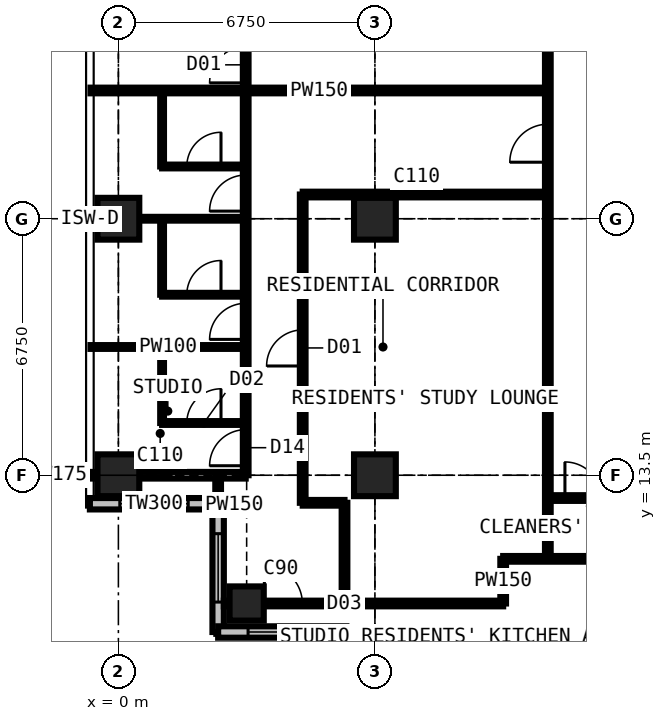
"""IFC4 building model, lengths in metres.
Left out: names, types, materials, properties, quantities, classifications, styles, units other than length and angle.
Written with IfcOpenShell. Run it as: python <this file> out.ifc"""

import sys

from ifc_helpers import new_model, si_unit, direction, frame, frame_2d, origin, origin_2d, place, context, subcontext, project, spatial, rectangle, extrude, element, fill, save


model = new_model("IFC4")
c1 = context("Model", 3, precision=1e-05, world=origin(), true_north=direction((0.0, 1.0)))
c2 = subcontext(c1, "Body", "Model", "MODEL_VIEW")
j1 = project(units=[si_unit("LENGTHUNIT", "METRE"), si_unit("PLANEANGLEUNIT", "RADIAN")], contexts=[c1])
p1 = place(None, origin())
s1 = spatial("IfcSite", under=j1, at=p1, CompositionType="ELEMENT")
p2 = place(p1, origin())
s2 = spatial("IfcBuilding", under=s1, at=p2, CompositionType="ELEMENT")
p3 = place(p2, frame((0.0, 0.0, 218.7)))
s3 = spatial("IfcBuildingStorey", under=s2, at=p3, CompositionType="ELEMENT", Elevation=218.7)
for number, where, z_axis, x_axis in (
    (1, (0.0, 13.5, 0.0), (0.0, 0.0, 1.0), (1.0, 0.0, 0.0)),
    (2, (0.0, 20.25, 0.0), (0.0, 0.0, 1.0), (1.0, 0.0, 0.0)),
):
    element("IfcColumn", number, at=place(p3, frame(where, z_axis=z_axis, x_axis=x_axis)), inside=s3, PredefinedType="COLUMN", context=c2, shape_type="SweptSolid", body=[
        extrude(rectangle(XDim=1.1, YDim=1.1, at=origin_2d()), origin(), (0.0, 0.0, 1.0), 3.6),
    ])
p4 = place(p3, frame((3.375, 10.125, 0.0), z_axis=(0.0, 0.0, 1.0), x_axis=(1.0, 0.0, 0.0)))
e3 = element("IfcColumn", 3, at=p4, inside=s3, PredefinedType="COLUMN", context=c2, shape_type="SweptSolid", body=[
    extrude(rectangle(XDim=0.9, YDim=0.9, at=origin_2d()), origin(), (0.0, 0.0, 1.0), 3.6),
])
for number, where, z_axis, x_axis in (
    (4, (6.75, 13.5, 0.0), (0.0, 0.0, 1.0), (1.0, 0.0, 0.0)),
    (5, (6.75, 20.25, 0.0), (0.0, 0.0, 1.0), (1.0, 0.0, 0.0)),
):
    element("IfcColumn", number, at=place(p3, frame(where, z_axis=z_axis, x_axis=x_axis)), inside=s3, PredefinedType="COLUMN", context=c2, shape_type="SweptSolid", body=[
        extrude(rectangle(XDim=1.1, YDim=1.1, at=origin_2d()), origin(), (0.0, 0.0, 1.0), 3.6),
    ])
p5 = place(p3, frame((-0.75, 12.75, 0.0), z_axis=(0.0, 0.0, 1.0), x_axis=(1.0, 0.0, 0.0)))
e6 = element("IfcWall", 6, at=p5, inside=s3, PredefinedType="SOLIDWALL", context=c2, shape_type="SweptSolid", body=[
    extrude(rectangle(XDim=3.375, YDim=0.3, at=frame_2d((1.688, 0.0))), origin(), (0.0, 0.0, 1.0), 3.375),
])
p6 = place(p5, frame((0.788, 0.0, 0.6)))
e7 = element("IfcOpeningElement", 7, at=p6, cuts=e6, PredefinedType="OPENING", context=c2, shape_type="SweptSolid", body=[
    extrude(rectangle(XDim=1.8, YDim=2.1, at=frame_2d((0.9, 1.05))), frame((0.0, 0.16, 0.0), z_axis=(0.0, -1.0, 0.0), x_axis=(1.0, 0.0, 0.0)), (0.0, 0.0, 1.0), 0.32),
])
p7 = place(p3, frame((2.625, 12.75, 0.0), z_axis=(0.0, 0.0, 1.0), x_axis=(0.0, -1.0, 0.0)))
e8 = element("IfcWall", 8, at=p7, inside=s3, PredefinedType="SOLIDWALL", context=c2, shape_type="SweptSolid", body=[
    extrude(rectangle(XDim=3.375, YDim=0.3, at=frame_2d((1.688, 0.0))), origin(), (0.0, 0.0, 1.0), 3.375),
])
p8 = place(p7, frame((0.788, 0.0, 0.6)))
e9 = element("IfcOpeningElement", 9, at=p8, cuts=e8, PredefinedType="OPENING", context=c2, shape_type="SweptSolid", body=[
    extrude(rectangle(XDim=1.8, YDim=2.1, at=frame_2d((0.9, 1.05))), frame((0.0, 0.16, 0.0), z_axis=(0.0, -1.0, 0.0), x_axis=(1.0, 0.0, 0.0)), (0.0, 0.0, 1.0), 0.32),
])
p9 = place(p3, frame((2.625, 9.375, 0.0), z_axis=(0.0, 0.0, 1.0), x_axis=(1.0, 0.0, 0.0)))
e10 = element("IfcWall", 10, at=p9, inside=s3, PredefinedType="SOLIDWALL", context=c2, shape_type="SweptSolid", body=[
    extrude(rectangle(XDim=3.375, YDim=0.3, at=frame_2d((1.688, 0.0))), origin(), (0.0, 0.0, 1.0), 3.375),
])
p10 = place(p9, frame((0.788, 0.0, 0.6)))
e11 = element("IfcOpeningElement", 11, at=p10, cuts=e10, PredefinedType="OPENING", context=c2, shape_type="SweptSolid", body=[
    extrude(rectangle(XDim=1.8, YDim=2.1, at=frame_2d((0.9, 1.05))), frame((0.0, 0.16, 0.0), z_axis=(0.0, -1.0, 0.0), x_axis=(1.0, 0.0, 0.0)), (0.0, 0.0, 1.0), 0.32),
])
p11 = place(p3, frame((6.0, 9.375, 0.0), z_axis=(0.0, 0.0, 1.0), x_axis=(0.0, -1.0, 0.0)))
e12 = element("IfcWall", 12, at=p11, inside=s3, PredefinedType="SOLIDWALL", context=c2, shape_type="SweptSolid", body=[
    extrude(rectangle(XDim=3.375, YDim=0.3, at=frame_2d((1.688, 0.0))), origin(), (0.0, 0.0, 1.0), 3.375),
])
p12 = place(p11, frame((0.788, 0.0, 0.6)))
e13 = element("IfcOpeningElement", 13, at=p12, cuts=e12, PredefinedType="OPENING", context=c2, shape_type="SweptSolid", body=[
    extrude(rectangle(XDim=1.8, YDim=2.1, at=frame_2d((0.9, 1.05))), frame((0.0, 0.16, 0.0), z_axis=(0.0, -1.0, 0.0), x_axis=(1.0, 0.0, 0.0)), (0.0, 0.0, 1.0), 0.32),
])
p13 = place(p3, frame((-0.734, 13.5, 0.0), z_axis=(0.0, 0.0, 1.0), x_axis=(1.0, 0.0, 0.0)))
e14 = element("IfcWall", 14, at=p13, inside=s3, PredefinedType="PARTITIONING", context=c2, shape_type="SweptSolid", body=[
    extrude(rectangle(XDim=4.084, YDim=0.175, at=frame_2d((2.042, 0.0))), origin(), (0.0, 0.0, 1.0), 2.877),
])
p14 = place(p3, frame((-0.734, 16.875, 0.0), z_axis=(0.0, 0.0, 1.0), x_axis=(1.0, 0.0, 0.0)))
e15 = element("IfcWall", 15, at=p14, inside=s3, PredefinedType="PARTITIONING", context=c2, shape_type="SweptSolid", body=[
    extrude(rectangle(XDim=4.084, YDim=0.1, at=frame_2d((2.042, 0.0))), origin(), (0.0, 0.0, 1.0), 3.375),
])
p15 = place(p3, frame((-0.734, 20.25, 0.0), z_axis=(0.0, 0.0, 1.0), x_axis=(1.0, 0.0, 0.0)))
e16 = element("IfcWall", 16, at=p15, inside=s3, PredefinedType="PARTITIONING", context=c2, shape_type="SweptSolid", body=[
    extrude(rectangle(XDim=4.084, YDim=0.1, at=frame_2d((2.042, 0.0))), origin(), (0.0, 0.0, 1.0), 2.877),
])
p16 = place(p3, frame((-0.734, 23.625, 0.0), z_axis=(0.0, 0.0, 1.0), x_axis=(1.0, 0.0, 0.0)))
e17 = element("IfcWall", 17, at=p16, inside=s3, PredefinedType="PARTITIONING", context=c2, shape_type="SweptSolid", body=[
    extrude(rectangle(XDim=12.034, YDim=0.15, at=frame_2d((6.017, 0.0))), origin(), (0.0, 0.0, 1.0), 3.375),
])
p17 = place(p3, frame((1.15, 14.875, 0.0), z_axis=(0.0, 0.0, 1.0), x_axis=(0.0, 1.0, 0.0)))
e18 = element("IfcWall", 18, at=p17, inside=s3, PredefinedType="PARTITIONING", context=c2, shape_type="SweptSolid", body=[
    extrude(rectangle(XDim=2.0, YDim=0.1, at=frame_2d((1.0, 0.0))), origin(), (0.0, 0.0, 1.0), 3.375),
])
p18 = place(p3, frame((1.15, 14.875, 0.0), z_axis=(0.0, 0.0, 1.0), x_axis=(1.0, 0.0, 0.0)))
e19 = element("IfcWall", 19, at=p18, inside=s3, PredefinedType="PARTITIONING", context=c2, shape_type="SweptSolid", body=[
    extrude(rectangle(XDim=2.2, YDim=0.1, at=frame_2d((1.1, 0.0))), origin(), (0.0, 0.0, 1.0), 3.375),
])
p19 = place(p18, frame((0.65, 0.0, 0.0)))
e20 = element("IfcOpeningElement", 20, at=p19, cuts=e19, PredefinedType="OPENING", context=c2, shape_type="SweptSolid", body=[
    extrude(rectangle(XDim=0.9, YDim=2.2, at=frame_2d((0.45, 1.1))), frame((0.0, 0.06, 0.0), z_axis=(0.0, -1.0, 0.0), x_axis=(1.0, 0.0, 0.0)), (0.0, 0.0, 1.0), 0.12),
])
p20 = place(p3, frame((1.15, 18.25, 0.0), z_axis=(0.0, 0.0, 1.0), x_axis=(0.0, 1.0, 0.0)))
e21 = element("IfcWall", 21, at=p20, inside=s3, PredefinedType="PARTITIONING", context=c2, shape_type="SweptSolid", body=[
    extrude(rectangle(XDim=2.0, YDim=0.1, at=frame_2d((1.0, 0.0))), origin(), (0.0, 0.0, 1.0), 3.375),
])
p21 = place(p3, frame((1.15, 18.25, 0.0), z_axis=(0.0, 0.0, 1.0), x_axis=(1.0, 0.0, 0.0)))
e22 = element("IfcWall", 22, at=p21, inside=s3, PredefinedType="PARTITIONING", context=c2, shape_type="SweptSolid", body=[
    extrude(rectangle(XDim=2.2, YDim=0.1, at=frame_2d((1.1, 0.0))), origin(), (0.0, 0.0, 1.0), 3.375),
])
p22 = place(p21, frame((0.65, 0.0, 0.0)))
e23 = element("IfcOpeningElement", 23, at=p22, cuts=e22, PredefinedType="OPENING", context=c2, shape_type="SweptSolid", body=[
    extrude(rectangle(XDim=0.9, YDim=2.2, at=frame_2d((0.45, 1.1))), frame((0.0, 0.06, 0.0), z_axis=(0.0, -1.0, 0.0), x_axis=(1.0, 0.0, 0.0)), (0.0, 0.0, 1.0), 0.12),
])
p23 = place(p3, frame((1.15, 21.625, 0.0), z_axis=(0.0, 0.0, 1.0), x_axis=(0.0, 1.0, 0.0)))
e24 = element("IfcWall", 24, at=p23, inside=s3, PredefinedType="PARTITIONING", context=c2, shape_type="SweptSolid", body=[
    extrude(rectangle(XDim=2.0, YDim=0.1, at=frame_2d((1.0, 0.0))), origin(), (0.0, 0.0, 1.0), 3.375),
])
p24 = place(p3, frame((1.15, 21.625, 0.0), z_axis=(0.0, 0.0, 1.0), x_axis=(1.0, 0.0, 0.0)))
e25 = element("IfcWall", 25, at=p24, inside=s3, PredefinedType="PARTITIONING", context=c2, shape_type="SweptSolid", body=[
    extrude(rectangle(XDim=2.2, YDim=0.1, at=frame_2d((1.1, 0.0))), origin(), (0.0, 0.0, 1.0), 3.375),
])
p25 = place(p24, frame((0.65, 0.0, 0.0)))
e26 = element("IfcOpeningElement", 26, at=p25, cuts=e25, PredefinedType="OPENING", context=c2, shape_type="SweptSolid", body=[
    extrude(rectangle(XDim=0.9, YDim=2.2, at=frame_2d((0.45, 1.1))), frame((0.0, 0.06, 0.0), z_axis=(0.0, -1.0, 0.0), x_axis=(1.0, 0.0, 0.0)), (0.0, 0.0, 1.0), 0.12),
])
p26 = place(p3, frame((2.625, 12.766, 0.0), z_axis=(0.0, 0.0, 1.0), x_axis=(0.0, 1.0, 0.0)))
e27 = element("IfcWall", 27, at=p26, inside=s3, PredefinedType="PARTITIONING", context=c2, shape_type="SweptSolid", body=[
    extrude(rectangle(XDim=0.734, YDim=0.15, at=frame_2d((0.367, 0.0))), origin(), (0.0, 0.0, 1.0), 3.375),
])
p27 = place(p3, frame((2.775, 10.125, 0.0), z_axis=(0.0, 0.0, 1.0), x_axis=(1.0, 0.0, 0.0)))
e28 = element("IfcWall", 28, at=p27, inside=s3, PredefinedType="PARTITIONING", context=c2, shape_type="SweptSolid", body=[
    extrude(rectangle(XDim=7.35, YDim=0.15, at=frame_2d((3.675, 0.0))), origin(), (0.0, 0.0, 1.0), 2.877),
])
p28 = place(p27, frame((1.066, 0.0, 0.0)))
e29 = element("IfcOpeningElement", 29, at=p28, cuts=e28, PredefinedType="OPENING", context=c2, shape_type="SweptSolid", body=[
    extrude(rectangle(XDim=1.0, YDim=2.2, at=frame_2d((0.5, 1.1))), frame((0.0, 0.085, 0.0), z_axis=(0.0, -1.0, 0.0), x_axis=(1.0, 0.0, 0.0)), (0.0, 0.0, 1.0), 0.17),
])
p29 = place(p3, frame((3.35, 13.5, 0.0), z_axis=(0.0, 0.0, 1.0), x_axis=(0.0, 1.0, 0.0)))
e30 = element("IfcWall", 30, at=p29, inside=s3, PredefinedType="PARTITIONING", context=c2, shape_type="SweptSolid", body=[
    extrude(rectangle(XDim=13.5, YDim=0.15, at=frame_2d((6.75, 0.0))), origin(), (0.0, 0.0, 1.0), 3.375),
])
p30 = place(p29, frame((10.325, 0.0, 0.0)))
e31 = element("IfcOpeningElement", 31, at=p30, cuts=e30, PredefinedType="OPENING", context=c2, shape_type="SweptSolid", body=[
    extrude(rectangle(XDim=0.95, YDim=2.2, at=frame_2d((0.475, 1.1))), frame((0.0, 0.085, 0.0), z_axis=(0.0, -1.0, 0.0), x_axis=(1.0, 0.0, 0.0)), (0.0, 0.0, 1.0), 0.17),
])
p31 = place(p29, frame((0.25, 0.0, 0.0)))
e32 = element("IfcOpeningElement", 32, at=p31, cuts=e30, PredefinedType="OPENING", context=c2, shape_type="SweptSolid", body=[
    extrude(rectangle(XDim=0.95, YDim=2.2, at=frame_2d((0.475, 1.1))), frame((0.0, 0.085, 0.0), z_axis=(0.0, -1.0, 0.0), x_axis=(1.0, 0.0, 0.0)), (0.0, 0.0, 1.0), 0.17),
])
p32 = place(p29, frame((3.575, 0.0, 0.0)))
e33 = element("IfcOpeningElement", 33, at=p32, cuts=e30, PredefinedType="OPENING", context=c2, shape_type="SweptSolid", body=[
    extrude(rectangle(XDim=0.95, YDim=2.2, at=frame_2d((0.475, 1.1))), frame((0.0, 0.085, 0.0), z_axis=(0.0, -1.0, 0.0), x_axis=(1.0, 0.0, 0.0)), (0.0, 0.0, 1.0), 0.17),
])
p33 = place(p29, frame((6.95, 0.0, 0.0)))
e34 = element("IfcOpeningElement", 34, at=p33, cuts=e30, PredefinedType="OPENING", context=c2, shape_type="SweptSolid", body=[
    extrude(rectangle(XDim=0.95, YDim=2.2, at=frame_2d((0.475, 1.1))), frame((0.0, 0.085, 0.0), z_axis=(0.0, -1.0, 0.0), x_axis=(1.0, 0.0, 0.0)), (0.0, 0.0, 1.0), 0.17),
])
p34 = place(p3, frame((4.85, 12.775, 0.0), z_axis=(0.0, 0.0, 1.0), x_axis=(0.0, 1.0, 0.0)))
e35 = element("IfcWall", 35, at=p34, inside=s3, PredefinedType="PARTITIONING", context=c2, shape_type="SweptSolid", body=[
    extrude(rectangle(XDim=8.113, YDim=0.15, at=frame_2d((4.056, 0.0))), origin(), (0.0, 0.0, 1.0), 3.375),
])
p35 = place(p34, frame((3.6, 0.0, 0.0)))
e36 = element("IfcOpeningElement", 36, at=p35, cuts=e35, PredefinedType="OPENING", context=c2, shape_type="SweptSolid", body=[
    extrude(rectangle(XDim=0.95, YDim=2.2, at=frame_2d((0.475, 1.1))), frame((0.0, 0.085, 0.0), z_axis=(0.0, -1.0, 0.0), x_axis=(1.0, 0.0, 0.0)), (0.0, 0.0, 1.0), 0.17),
])
p36 = place(p3, frame((4.85, 12.775, 0.0), z_axis=(0.0, 0.0, 1.0), x_axis=(1.0, 0.0, 0.0)))
e37 = element("IfcWall", 37, at=p36, inside=s3, PredefinedType="PARTITIONING", context=c2, shape_type="SweptSolid", body=[
    extrude(rectangle(XDim=1.1, YDim=0.15, at=frame_2d((0.55, 0.0))), origin(), (0.0, 0.0, 1.0), 3.375),
])
p37 = place(p3, frame((4.85, 20.887, 0.0), z_axis=(0.0, 0.0, 1.0), x_axis=(1.0, 0.0, 0.0)))
e38 = element("IfcWall", 38, at=p37, inside=s3, PredefinedType="PARTITIONING", context=c2, shape_type="SweptSolid", body=[
    extrude(rectangle(XDim=6.45, YDim=0.15, at=frame_2d((3.225, 0.0))), origin(), (0.0, 0.0, 1.0), 3.375),
])
p38 = place(p3, frame((5.95, 10.125, 0.0), z_axis=(0.0, 0.0, 1.0), x_axis=(0.0, 1.0, 0.0)))
e39 = element("IfcWall", 39, at=p38, inside=s3, PredefinedType="PARTITIONING", context=c2, shape_type="SweptSolid", body=[
    extrude(rectangle(XDim=2.65, YDim=0.15, at=frame_2d((1.325, 0.0))), origin(), (0.0, 0.0, 1.0), 3.375),
])
p39 = place(p3, frame((10.125, 10.125, 0.0), z_axis=(0.0, 0.0, 1.0), x_axis=(0.0, 1.0, 0.0)))
e40 = element("IfcWall", 40, at=p39, inside=s3, PredefinedType="PARTITIONING", context=c2, shape_type="SweptSolid", body=[
    extrude(rectangle(XDim=1.175, YDim=0.15, at=frame_2d((0.587, 0.0))), origin(), (0.0, 0.0, 1.0), 3.375),
])
p40 = place(p3, frame((10.125, 11.3, 0.0), z_axis=(0.0, 0.0, 1.0), x_axis=(1.0, 0.0, 0.0)))
e41 = element("IfcWall", 41, at=p40, inside=s3, PredefinedType="PARTITIONING", context=c2, shape_type="SweptSolid", body=[
    extrude(rectangle(XDim=20.25, YDim=0.15, at=frame_2d((10.125, 0.0))), origin(), (0.0, 0.0, 1.0), 3.375),
])
p41 = place(p40, frame((6.95, 0.0, 0.0)))
e42 = element("IfcOpeningElement", 42, at=p41, cuts=e41, PredefinedType="OPENING", context=c2, shape_type="SweptSolid", body=[
    extrude(rectangle(XDim=0.95, YDim=2.2, at=frame_2d((0.475, 1.1))), frame((0.0, 0.085, 0.0), z_axis=(0.0, -1.0, 0.0), x_axis=(1.0, 0.0, 0.0)), (0.0, 0.0, 1.0), 0.17),
])
p42 = place(p40, frame((10.375, 0.0, 0.0)))
e43 = element("IfcOpeningElement", 43, at=p42, cuts=e41, PredefinedType="OPENING", context=c2, shape_type="SweptSolid", body=[
    extrude(rectangle(XDim=0.95, YDim=2.2, at=frame_2d((0.475, 1.1))), frame((0.0, 0.085, 0.0), z_axis=(0.0, -1.0, 0.0), x_axis=(1.0, 0.0, 0.0)), (0.0, 0.0, 1.0), 0.17),
])
p43 = place(p40, frame((13.75, 0.0, 0.0)))
e44 = element("IfcOpeningElement", 44, at=p43, cuts=e41, PredefinedType="OPENING", context=c2, shape_type="SweptSolid", body=[
    extrude(rectangle(XDim=0.95, YDim=2.2, at=frame_2d((0.475, 1.1))), frame((0.0, 0.085, 0.0), z_axis=(0.0, -1.0, 0.0), x_axis=(1.0, 0.0, 0.0)), (0.0, 0.0, 1.0), 0.17),
])
p44 = place(p40, frame((17.475, 0.0, 0.0)))
e45 = element("IfcOpeningElement", 45, at=p44, cuts=e41, PredefinedType="OPENING", context=c2, shape_type="SweptSolid", body=[
    extrude(rectangle(XDim=1.0, YDim=2.2, at=frame_2d((0.5, 1.1))), frame((0.0, 0.085, 0.0), z_axis=(0.0, -1.0, 0.0), x_axis=(1.0, 0.0, 0.0)), (0.0, 0.0, 1.0), 0.17),
])
p45 = place(p3, frame((11.3, 11.3, 0.0), z_axis=(0.0, 0.0, 1.0), x_axis=(0.0, 1.0, 0.0)))
e46 = element("IfcWall", 46, at=p45, inside=s3, PredefinedType="PARTITIONING", context=c2, shape_type="SweptSolid", body=[
    extrude(rectangle(XDim=19.3, YDim=0.15, at=frame_2d((9.65, 0.0))), origin(), (0.0, 0.0, 1.0), 3.375),
])
p46 = place(p45, frame((13.525, 0.0, 0.0)))
e47 = element("IfcOpeningElement", 47, at=p46, cuts=e46, PredefinedType="OPENING", context=c2, shape_type="SweptSolid", body=[
    extrude(rectangle(XDim=1.0, YDim=2.2, at=frame_2d((0.5, 1.1))), frame((0.0, 0.085, 0.0), z_axis=(0.0, -1.0, 0.0), x_axis=(1.0, 0.0, 0.0)), (0.0, 0.0, 1.0), 0.17),
])
p47 = place(p45, frame((10.438, 0.0, 0.0)))
e48 = element("IfcOpeningElement", 48, at=p47, cuts=e46, PredefinedType="OPENING", context=c2, shape_type="SweptSolid", body=[
    extrude(rectangle(XDim=1.0, YDim=2.2, at=frame_2d((0.5, 1.1))), frame((0.0, 0.085, 0.0), z_axis=(0.0, -1.0, 0.0), x_axis=(1.0, 0.0, 0.0)), (0.0, 0.0, 1.0), 0.17),
])
p48 = place(p3, frame((11.3, 12.9, 0.0), z_axis=(0.0, 0.0, 1.0), x_axis=(1.0, 0.0, 0.0)))
e49 = element("IfcWall", 49, at=p48, inside=s3, PredefinedType="PARTITIONING", context=c2, shape_type="SweptSolid", body=[
    extrude(rectangle(XDim=1.9, YDim=0.15, at=frame_2d((0.95, 0.0))), origin(), (0.0, 0.0, 1.0), 2.877),
])
p49 = place(p48, frame((0.45, 0.0, 0.0)))
e50 = element("IfcOpeningElement", 50, at=p49, cuts=e49, PredefinedType="OPENING", context=c2, shape_type="SweptSolid", body=[
    extrude(rectangle(XDim=0.95, YDim=2.2, at=frame_2d((0.475, 1.1))), frame((0.0, 0.085, 0.0), z_axis=(0.0, -1.0, 0.0), x_axis=(1.0, 0.0, 0.0)), (0.0, 0.0, 1.0), 0.17),
])
p50 = place(p6, origin())
e51 = element("IfcWindow", 51, at=p50, inside=s3, PartitioningType="SINGLE_PANEL", PredefinedType="WINDOW", context=c2, shape_type="SweptSolid", body=[
    extrude(rectangle(XDim=1.8, YDim=2.1, at=frame_2d((0.9, 1.05))), frame((0.0, 0.03, 0.0), z_axis=(0.0, -1.0, 0.0), x_axis=(1.0, 0.0, 0.0)), (0.0, 0.0, 1.0), 0.06),
])
fill(e7, e51)
p51 = place(p8, origin())
e52 = element("IfcWindow", 52, at=p51, inside=s3, PartitioningType="SINGLE_PANEL", PredefinedType="WINDOW", context=c2, shape_type="SweptSolid", body=[
    extrude(rectangle(XDim=1.8, YDim=2.1, at=frame_2d((0.9, 1.05))), frame((0.0, 0.03, 0.0), z_axis=(0.0, -1.0, 0.0), x_axis=(1.0, 0.0, 0.0)), (0.0, 0.0, 1.0), 0.06),
])
fill(e9, e52)
p52 = place(p10, origin())
e53 = element("IfcWindow", 53, at=p52, inside=s3, PartitioningType="SINGLE_PANEL", PredefinedType="WINDOW", context=c2, shape_type="SweptSolid", body=[
    extrude(rectangle(XDim=1.8, YDim=2.1, at=frame_2d((0.9, 1.05))), frame((0.0, 0.03, 0.0), z_axis=(0.0, -1.0, 0.0), x_axis=(1.0, 0.0, 0.0)), (0.0, 0.0, 1.0), 0.06),
])
fill(e11, e53)
p53 = place(p49, origin())
e54 = element("IfcDoor", 54, at=p53, inside=s3, OperationType="SINGLE_SWING_LEFT", PredefinedType="DOOR", context=c2, shape_type="SweptSolid", body=[
    extrude(rectangle(XDim=0.95, YDim=2.2, at=frame_2d((0.475, 1.1))), frame((0.0, 0.025, 0.0), z_axis=(0.0, -1.0, 0.0), x_axis=(1.0, 0.0, 0.0)), (0.0, 0.0, 1.0), 0.05),
])
fill(e50, e54)
p54 = place(p28, origin())
e55 = element("IfcDoor", 55, at=p54, inside=s3, OperationType="SINGLE_SWING_LEFT", PredefinedType="DOOR", context=c2, shape_type="SweptSolid", body=[
    extrude(rectangle(XDim=1.0, YDim=2.2, at=frame_2d((0.5, 1.1))), frame((0.0, 0.025, 0.0), z_axis=(0.0, -1.0, 0.0), x_axis=(1.0, 0.0, 0.0)), (0.0, 0.0, 1.0), 0.05),
])
fill(e29, e55)
p55 = place(p30, origin())
e56 = element("IfcDoor", 56, at=p55, inside=s3, OperationType="SINGLE_SWING_LEFT", PredefinedType="DOOR", context=c2, shape_type="SweptSolid", body=[
    extrude(rectangle(XDim=0.95, YDim=2.2, at=frame_2d((0.475, 1.1))), frame((0.0, 0.025, 0.0), z_axis=(0.0, -1.0, 0.0), x_axis=(1.0, 0.0, 0.0)), (0.0, 0.0, 1.0), 0.05),
])
fill(e31, e56)
p56 = place(p31, origin())
e57 = element("IfcDoor", 57, at=p56, inside=s3, OperationType="SINGLE_SWING_LEFT", PredefinedType="DOOR", context=c2, shape_type="SweptSolid", body=[
    extrude(rectangle(XDim=0.95, YDim=2.2, at=frame_2d((0.475, 1.1))), frame((0.0, 0.025, 0.0), z_axis=(0.0, -1.0, 0.0), x_axis=(1.0, 0.0, 0.0)), (0.0, 0.0, 1.0), 0.05),
])
fill(e32, e57)
p57 = place(p19, origin())
e58 = element("IfcDoor", 58, at=p57, inside=s3, OperationType="SINGLE_SWING_RIGHT", PredefinedType="DOOR", context=c2, shape_type="SweptSolid", body=[
    extrude(rectangle(XDim=0.9, YDim=2.2, at=frame_2d((0.45, 1.1))), frame((0.0, 0.025, 0.0), z_axis=(0.0, -1.0, 0.0), x_axis=(1.0, 0.0, 0.0)), (0.0, 0.0, 1.0), 0.05),
])
fill(e20, e58)
p58 = place(p32, origin())
e59 = element("IfcDoor", 59, at=p58, inside=s3, OperationType="SINGLE_SWING_LEFT", PredefinedType="DOOR", context=c2, shape_type="SweptSolid", body=[
    extrude(rectangle(XDim=0.95, YDim=2.2, at=frame_2d((0.475, 1.1))), frame((0.0, 0.025, 0.0), z_axis=(0.0, -1.0, 0.0), x_axis=(1.0, 0.0, 0.0)), (0.0, 0.0, 1.0), 0.05),
])
fill(e33, e59)
p59 = place(p22, origin())
e60 = element("IfcDoor", 60, at=p59, inside=s3, OperationType="SINGLE_SWING_RIGHT", PredefinedType="DOOR", context=c2, shape_type="SweptSolid", body=[
    extrude(rectangle(XDim=0.9, YDim=2.2, at=frame_2d((0.45, 1.1))), frame((0.0, 0.025, 0.0), z_axis=(0.0, -1.0, 0.0), x_axis=(1.0, 0.0, 0.0)), (0.0, 0.0, 1.0), 0.05),
])
fill(e23, e60)
p60 = place(p33, origin())
e61 = element("IfcDoor", 61, at=p60, inside=s3, OperationType="SINGLE_SWING_LEFT", PredefinedType="DOOR", context=c2, shape_type="SweptSolid", body=[
    extrude(rectangle(XDim=0.95, YDim=2.2, at=frame_2d((0.475, 1.1))), frame((0.0, 0.025, 0.0), z_axis=(0.0, -1.0, 0.0), x_axis=(1.0, 0.0, 0.0)), (0.0, 0.0, 1.0), 0.05),
])
fill(e34, e61)
p61 = place(p25, origin())
e62 = element("IfcDoor", 62, at=p61, inside=s3, OperationType="SINGLE_SWING_RIGHT", PredefinedType="DOOR", context=c2, shape_type="SweptSolid", body=[
    extrude(rectangle(XDim=0.9, YDim=2.2, at=frame_2d((0.45, 1.1))), frame((0.0, 0.025, 0.0), z_axis=(0.0, -1.0, 0.0), x_axis=(1.0, 0.0, 0.0)), (0.0, 0.0, 1.0), 0.05),
])
fill(e26, e62)
p62 = place(p47, origin())
e63 = element("IfcDoor", 63, at=p62, inside=s3, OperationType="SINGLE_SWING_LEFT", PredefinedType="DOOR", context=c2, shape_type="SweptSolid", body=[
    extrude(rectangle(XDim=1.0, YDim=2.2, at=frame_2d((0.5, 1.1))), frame((0.0, 0.025, 0.0), z_axis=(0.0, -1.0, 0.0), x_axis=(1.0, 0.0, 0.0)), (0.0, 0.0, 1.0), 0.05),
])
fill(e48, e63)
p63 = place(p35, origin())
e64 = element("IfcDoor", 64, at=p63, inside=s3, OperationType="SINGLE_SWING_LEFT", PredefinedType="DOOR", context=c2, shape_type="SweptSolid", body=[
    extrude(rectangle(XDim=0.95, YDim=2.2, at=frame_2d((0.475, 1.1))), frame((0.0, 0.025, 0.0), z_axis=(0.0, -1.0, 0.0), x_axis=(1.0, 0.0, 0.0)), (0.0, 0.0, 1.0), 0.05),
])
fill(e36, e64)
save(model, sys.argv[1])
